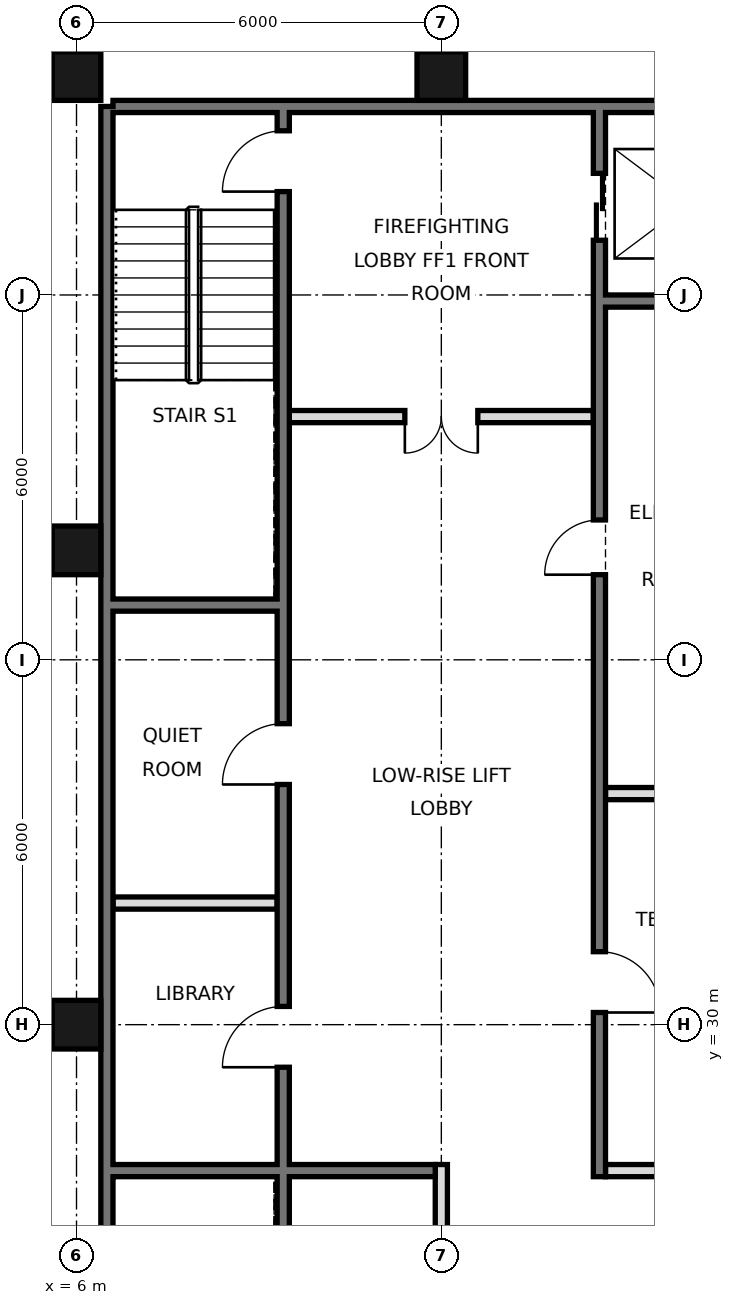
"""IFC4 building model, lengths in metres.
Left out: names, types, materials, properties, quantities, classifications, styles, units other than length and angle.
Written with IfcOpenShell. Run it as: python <this file> out.ifc"""

import sys

from ifc_helpers import new_model, si_unit, direction, frame, frame_2d, origin, origin_2d, place, context, subcontext, project, spatial, rectangle, hollow_rectangle, extrude, element, fill, save


model = new_model("IFC4")
c1 = context("Model", 3, precision=1e-05, world=origin(), true_north=direction((0.0, 1.0)))
c2 = subcontext(c1, "Body", "Model", "MODEL_VIEW")
j1 = project(units=[si_unit("LENGTHUNIT", "METRE"), si_unit("PLANEANGLEUNIT", "RADIAN")], contexts=[c1])
p1 = place(None, origin())
s1 = spatial("IfcSite", under=j1, at=p1, CompositionType="ELEMENT")
p2 = place(p1, origin())
s2 = spatial("IfcBuilding", under=s1, at=p2, CompositionType="ELEMENT")
p3 = place(p2, frame((0.0, 0.0, 301.6)))
s3 = spatial("IfcBuildingStorey", under=s2, at=p3, CompositionType="ELEMENT", Elevation=301.6)
for number, where, z_axis, x_axis in (
    (1, (6.0, 30.0, 0.0), (0.0, 0.0, 1.0), (1.0, 0.0, 0.0)),
    (2, (6.0, 37.8, 0.0), (0.0, 0.0, 1.0), (1.0, 0.0, 0.0)),
    (3, (6.0, 45.6, 0.0), (0.0, 0.0, 1.0), (1.0, 0.0, 0.0)),
    (4, (12.0, 45.6, 0.0), (0.0, 0.0, 1.0), (1.0, 0.0, 0.0)),
):
    element("IfcColumn", number, at=place(p3, frame(where, z_axis=z_axis, x_axis=x_axis)), inside=s3, PredefinedType="COLUMN", context=c2, shape_type="SweptSolid", body=[
        extrude(hollow_rectangle(XDim=0.8, YDim=0.8, WallThickness=0.025, at=origin_2d()), origin(), (0.0, 0.0, 1.0), 3.6),
    ])
p4 = place(p3, frame((6.5, 21.6, 0.0), z_axis=(0.0, 0.0, 1.0), x_axis=(0.0, 1.0, 0.0)))
e5 = element("IfcWall", 5, at=p4, inside=s3, PredefinedType="SOLIDWALL", context=c2, shape_type="SweptSolid", body=[
    extrude(rectangle(XDim=23.5, YDim=0.2, at=frame_2d((11.75, 0.0))), origin(), (0.0, 0.0, 1.0), 3.42),
])
p5 = place(p3, frame((6.6, 45.1, 0.0), z_axis=(0.0, 0.0, 1.0), x_axis=(1.0, 0.0, 0.0)))
e6 = element("IfcWall", 6, at=p5, inside=s3, PredefinedType="SOLIDWALL", context=c2, shape_type="SweptSolid", body=[
    extrude(rectangle(XDim=34.8, YDim=0.2, at=frame_2d((17.4, 0.0))), origin(), (0.0, 0.0, 1.0), 3.42),
])
p6 = place(p3, frame((12.0, 21.6, 0.0), z_axis=(0.0, 0.0, 1.0), x_axis=(0.0, 1.0, 0.0)))
e7 = element("IfcWall", 7, at=p6, inside=s3, PredefinedType="PARTITIONING", context=c2, shape_type="SweptSolid", body=[
    extrude(rectangle(XDim=6.1, YDim=0.2, at=frame_2d((3.05, 0.0))), origin(), (0.0, 0.0, 1.0), 3.42),
])
p7 = place(p3, frame((14.6, 27.5, 0.0), z_axis=(0.0, 0.0, 1.0), x_axis=(0.0, 1.0, 0.0)))
e8 = element("IfcWall", 8, at=p7, inside=s3, PredefinedType="SOLIDWALL", context=c2, shape_type="SweptSolid", body=[
    extrude(rectangle(XDim=17.5, YDim=0.2, at=frame_2d((8.75, 0.0))), origin(), (0.0, 0.0, 1.0), 3.42),
])
p8 = place(p7, frame((15.4, 0.0, 0.0)))
e9 = element("IfcOpeningElement", 9, at=p8, cuts=e8, PredefinedType="OPENING", context=c2, shape_type="SweptSolid", body=[
    extrude(rectangle(XDim=1.1, YDim=2.1, at=frame_2d((0.55, 1.05))), frame((0.0, 0.11, 0.0), z_axis=(0.0, -1.0, 0.0), x_axis=(1.0, 0.0, 0.0)), (0.0, 0.0, 1.0), 0.22),
])
p9 = place(p7, frame((2.7, 0.0, 0.0)))
e10 = element("IfcOpeningElement", 10, at=p9, cuts=e8, PredefinedType="OPENING", context=c2, shape_type="SweptSolid", body=[
    extrude(rectangle(XDim=1.0, YDim=2.1, at=frame_2d((0.5, 1.05))), frame((0.0, 0.11, 0.0), z_axis=(0.0, -1.0, 0.0), x_axis=(1.0, 0.0, 0.0)), (0.0, 0.0, 1.0), 0.22),
])
p10 = place(p7, frame((9.9, 0.0, 0.0)))
e11 = element("IfcOpeningElement", 11, at=p10, cuts=e8, PredefinedType="OPENING", context=c2, shape_type="SweptSolid", body=[
    extrude(rectangle(XDim=0.9, YDim=2.1, at=frame_2d((0.45, 1.05))), frame((0.0, 0.11, 0.0), z_axis=(0.0, -1.0, 0.0), x_axis=(1.0, 0.0, 0.0)), (0.0, 0.0, 1.0), 0.22),
])
p11 = place(p3, frame((9.4, 21.6, 0.0), z_axis=(0.0, 0.0, 1.0), x_axis=(0.0, 1.0, 0.0)))
e12 = element("IfcWall", 12, at=p11, inside=s3, PredefinedType="SOLIDWALL", context=c2, shape_type="SweptSolid", body=[
    extrude(rectangle(XDim=23.4, YDim=0.2, at=frame_2d((11.7, 0.0))), origin(), (0.0, 0.0, 1.0), 3.42),
])
p12 = place(p11, frame((7.7, 0.0, 0.0)))
e13 = element("IfcOpeningElement", 13, at=p12, cuts=e12, PredefinedType="OPENING", context=c2, shape_type="SweptSolid", body=[
    extrude(rectangle(XDim=1.0, YDim=2.1, at=frame_2d((0.5, 1.05))), frame((0.0, 0.11, 0.0), z_axis=(0.0, -1.0, 0.0), x_axis=(1.0, 0.0, 0.0)), (0.0, 0.0, 1.0), 0.22),
])
p13 = place(p11, frame((12.35, 0.0, 0.0)))
e14 = element("IfcOpeningElement", 14, at=p13, cuts=e12, PredefinedType="OPENING", context=c2, shape_type="SweptSolid", body=[
    extrude(rectangle(XDim=1.0, YDim=2.1, at=frame_2d((0.5, 1.05))), frame((0.0, 0.11, 0.0), z_axis=(0.0, -1.0, 0.0), x_axis=(1.0, 0.0, 0.0)), (0.0, 0.0, 1.0), 0.22),
])
p14 = place(p11, frame((22.1, 0.0, 0.0)))
e15 = element("IfcOpeningElement", 15, at=p14, cuts=e12, PredefinedType="OPENING", context=c2, shape_type="SweptSolid", body=[
    extrude(rectangle(XDim=1.0, YDim=2.1, at=frame_2d((0.5, 1.05))), frame((0.0, 0.11, 0.0), z_axis=(0.0, -1.0, 0.0), x_axis=(1.0, 0.0, 0.0)), (0.0, 0.0, 1.0), 0.22),
])
p15 = place(p11, frame((0.175, 0.0, 0.0)))
e16 = element("IfcOpeningElement", 16, at=p15, cuts=e12, PredefinedType="OPENING", context=c2, shape_type="SweptSolid", body=[
    extrude(rectangle(XDim=0.9, YDim=2.1, at=frame_2d((0.45, 1.05))), frame((0.0, 0.11, 0.0), z_axis=(0.0, -1.0, 0.0), x_axis=(1.0, 0.0, 0.0)), (0.0, 0.0, 1.0), 0.22),
])
p16 = place(p3, frame((14.7, 27.6, 0.0), z_axis=(0.0, 0.0, 1.0), x_axis=(1.0, 0.0, 0.0)))
e17 = element("IfcWall", 17, at=p16, inside=s3, PredefinedType="PARTITIONING", context=c2, shape_type="SweptSolid", body=[
    extrude(rectangle(XDim=2.7, YDim=0.2, at=frame_2d((1.35, 0.0))), origin(), (0.0, 0.0, 1.0), 3.42),
])
p17 = place(p3, frame((6.6, 27.6, 0.0), z_axis=(0.0, 0.0, 1.0), x_axis=(1.0, 0.0, 0.0)))
e18 = element("IfcWall", 18, at=p17, inside=s3, PredefinedType="SOLIDWALL", context=c2, shape_type="SweptSolid", body=[
    extrude(rectangle(XDim=5.3, YDim=0.2, at=frame_2d((2.65, 0.0))), origin(), (0.0, 0.0, 1.0), 3.42),
])
p18 = place(p3, frame((6.6, 32.0, 0.0), z_axis=(0.0, 0.0, 1.0), x_axis=(1.0, 0.0, 0.0)))
e19 = element("IfcWall", 19, at=p18, inside=s3, PredefinedType="PARTITIONING", context=c2, shape_type="SweptSolid", body=[
    extrude(rectangle(XDim=2.7, YDim=0.2, at=frame_2d((1.35, 0.0))), origin(), (0.0, 0.0, 1.0), 3.42),
])
for number, where, z_axis, x_axis in (
    (20, (14.7, 33.8, 0.0), (0.0, 0.0, 1.0), (1.0, 0.0, 0.0)),
    (21, (6.6, 36.9, 0.0), (0.0, 0.0, 1.0), (1.0, 0.0, 0.0)),
):
    element("IfcWall", number, at=place(p3, frame(where, z_axis=z_axis, x_axis=x_axis)), inside=s3, PredefinedType="SOLIDWALL", context=c2, shape_type="SweptSolid", body=[
        extrude(rectangle(XDim=2.7, YDim=0.2, at=frame_2d((1.35, 0.0))), origin(), (0.0, 0.0, 1.0), 3.42),
    ])
p19 = place(p3, frame((9.5, 40.0, 0.0), z_axis=(0.0, 0.0, 1.0), x_axis=(1.0, 0.0, 0.0)))
e22 = element("IfcWall", 22, at=p19, inside=s3, PredefinedType="PARTITIONING", context=c2, shape_type="SweptSolid", body=[
    extrude(rectangle(XDim=5.0, YDim=0.2, at=frame_2d((2.5, 0.0))), origin(), (0.0, 0.0, 1.0), 3.42),
])
p20 = place(p19, frame((1.9, 0.0, 0.0)))
e23 = element("IfcOpeningElement", 23, at=p20, cuts=e22, PredefinedType="OPENING", context=c2, shape_type="SweptSolid", body=[
    extrude(rectangle(XDim=1.2, YDim=2.1, at=frame_2d((0.6, 1.05))), frame((0.0, 0.11, 0.0), z_axis=(0.0, -1.0, 0.0), x_axis=(1.0, 0.0, 0.0)), (0.0, 0.0, 1.0), 0.22),
])
p21 = place(p3, frame((14.7, 41.9, 0.0), z_axis=(0.0, 0.0, 1.0), x_axis=(1.0, 0.0, 0.0)))
e24 = element("IfcWall", 24, at=p21, inside=s3, PredefinedType="SOLIDWALL", context=c2, shape_type="SweptSolid", body=[
    extrude(rectangle(XDim=2.7, YDim=0.2, at=frame_2d((1.35, 0.0))), origin(), (0.0, 0.0, 1.0), 3.42),
])
p22 = place(p20, frame((1.2, 0.0, 0.0), z_axis=(0.0, 0.0, 1.0), x_axis=(-1.0, 0.0, 0.0)))
e25 = element("IfcDoor", 25, at=p22, inside=s3, OperationType="DOUBLE_DOOR_SINGLE_SWING", PredefinedType="DOOR", context=c2, shape_type="SweptSolid", body=[
    extrude(rectangle(XDim=1.2, YDim=2.1, at=frame_2d((0.6, 1.05))), frame((0.0, 0.025, 0.0), z_axis=(0.0, -1.0, 0.0), x_axis=(1.0, 0.0, 0.0)), (0.0, 0.0, 1.0), 0.05),
])
fill(e23, e25)
p23 = place(p8, origin())
e26 = element("IfcDoor", 26, at=p23, inside=s3, OperationType="DOUBLE_DOOR_SLIDING", PredefinedType="DOOR", context=c2, shape_type="SweptSolid", body=[
    extrude(rectangle(XDim=1.1, YDim=2.1, at=frame_2d((0.55, 1.05))), frame((0.0, 0.025, 0.0), z_axis=(0.0, -1.0, 0.0), x_axis=(1.0, 0.0, 0.0)), (0.0, 0.0, 1.0), 0.05),
])
fill(e9, e26)
p24 = place(p9, frame((1.0, 0.0, 0.0), z_axis=(0.0, 0.0, 1.0), x_axis=(-1.0, 0.0, 0.0)))
e27 = element("IfcDoor", 27, at=p24, inside=s3, OperationType="SINGLE_SWING_RIGHT", PredefinedType="DOOR", context=c2, shape_type="SweptSolid", body=[
    extrude(rectangle(XDim=1.0, YDim=2.1, at=frame_2d((0.5, 1.05))), frame((0.0, 0.025, 0.0), z_axis=(0.0, -1.0, 0.0), x_axis=(1.0, 0.0, 0.0)), (0.0, 0.0, 1.0), 0.05),
])
fill(e10, e27)
p25 = place(p12, origin())
e28 = element("IfcDoor", 28, at=p25, inside=s3, OperationType="SINGLE_SWING_LEFT", PredefinedType="DOOR", context=c2, shape_type="SweptSolid", body=[
    extrude(rectangle(XDim=1.0, YDim=2.1, at=frame_2d((0.5, 1.05))), frame((0.0, 0.025, 0.0), z_axis=(0.0, -1.0, 0.0), x_axis=(1.0, 0.0, 0.0)), (0.0, 0.0, 1.0), 0.05),
])
fill(e13, e28)
p26 = place(p13, origin())
e29 = element("IfcDoor", 29, at=p26, inside=s3, OperationType="SINGLE_SWING_LEFT", PredefinedType="DOOR", context=c2, shape_type="SweptSolid", body=[
    extrude(rectangle(XDim=1.0, YDim=2.1, at=frame_2d((0.5, 1.05))), frame((0.0, 0.025, 0.0), z_axis=(0.0, -1.0, 0.0), x_axis=(1.0, 0.0, 0.0)), (0.0, 0.0, 1.0), 0.05),
])
fill(e14, e29)
p27 = place(p14, origin())
e30 = element("IfcDoor", 30, at=p27, inside=s3, OperationType="SINGLE_SWING_LEFT", PredefinedType="DOOR", context=c2, shape_type="SweptSolid", body=[
    extrude(rectangle(XDim=1.0, YDim=2.1, at=frame_2d((0.5, 1.05))), frame((0.0, 0.025, 0.0), z_axis=(0.0, -1.0, 0.0), x_axis=(1.0, 0.0, 0.0)), (0.0, 0.0, 1.0), 0.05),
])
fill(e15, e30)
p28 = place(p10, origin())
e31 = element("IfcDoor", 31, at=p28, inside=s3, OperationType="SINGLE_SWING_LEFT", PredefinedType="DOOR", context=c2, shape_type="SweptSolid", body=[
    extrude(rectangle(XDim=0.9, YDim=2.1, at=frame_2d((0.45, 1.05))), frame((0.0, 0.025, 0.0), z_axis=(0.0, -1.0, 0.0), x_axis=(1.0, 0.0, 0.0)), (0.0, 0.0, 1.0), 0.05),
])
fill(e11, e31)
save(model, sys.argv[1])
